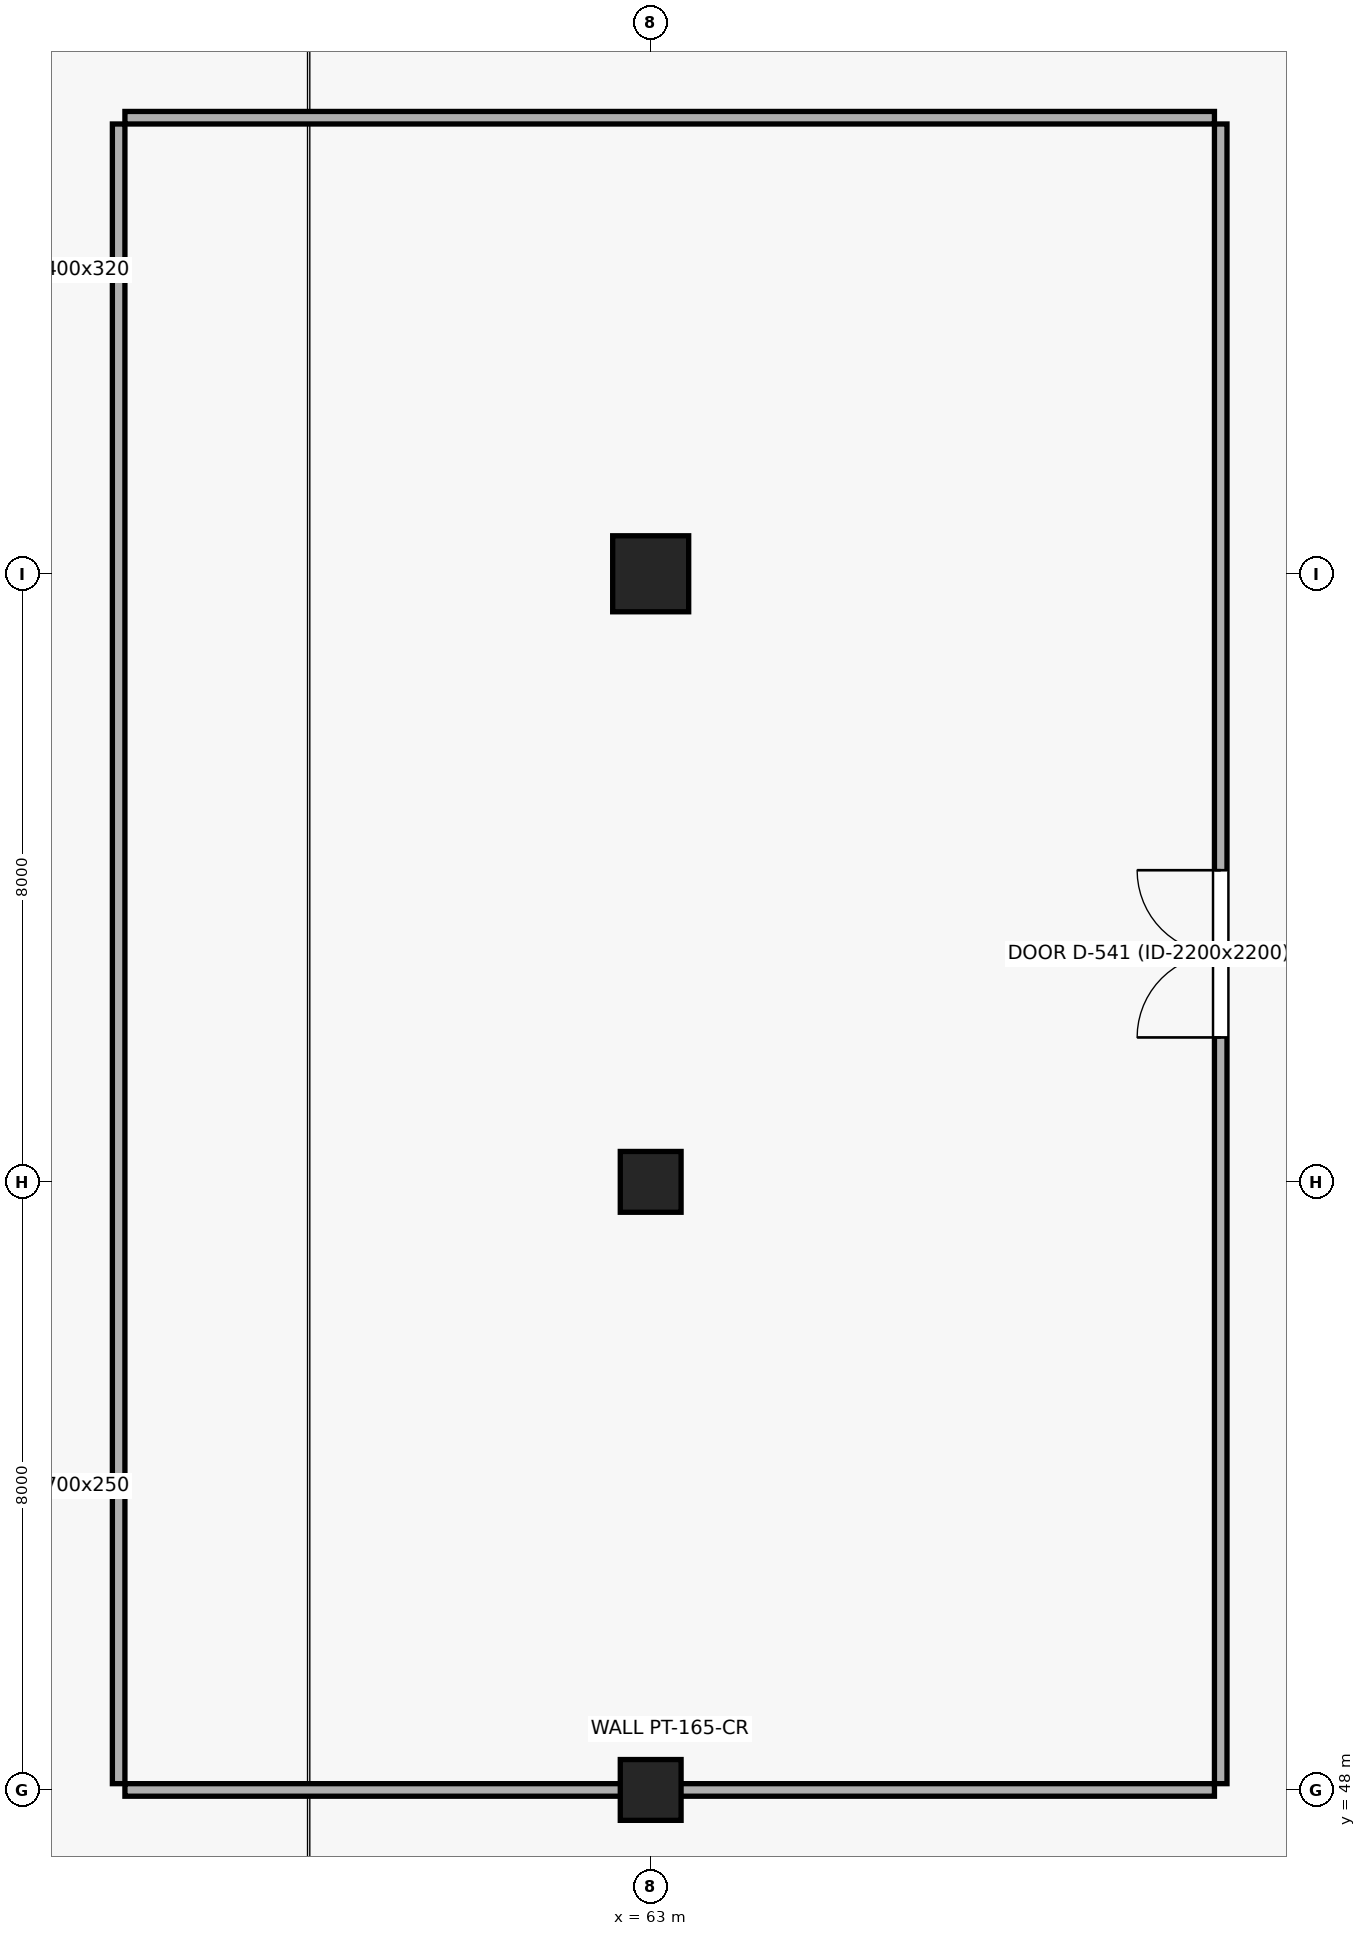
"""IFC4 building model, lengths in metres.
Left out: names, types, materials, properties, quantities, classifications, styles, units other than length and angle.
Written with IfcOpenShell. Run it as: python <this file> out.ifc"""

import sys

from ifc_helpers import new_model, si_unit, direction, frame, frame_2d, origin, origin_2d, place, context, subcontext, project, spatial, rectangle, extrude, element, fill, save


model = new_model("IFC4")
c1 = context("Model", 3, precision=1e-05, world=origin(), true_north=direction((0.0, 1.0)))
c2 = subcontext(c1, "Body", "Model", "MODEL_VIEW")
j1 = project(units=[si_unit("LENGTHUNIT", "METRE"), si_unit("PLANEANGLEUNIT", "RADIAN")], contexts=[c1])
p1 = place(None, origin())
s1 = spatial("IfcSite", under=j1, at=p1, CompositionType="ELEMENT")
p2 = place(p1, origin())
s2 = spatial("IfcBuilding", under=s1, at=p2, CompositionType="ELEMENT")
p3 = place(p2, frame((0.0, 0.0, 9.0)))
s3 = spatial("IfcBuildingStorey", under=s2, at=p3, CompositionType="ELEMENT", Elevation=9.0)
for number, where, z_axis, x_axis in (
    (1, (63.0, 48.0, 0.0), (0.0, 0.0, 1.0), (1.0, 0.0, 0.0)),
    (2, (63.0, 56.0, 0.0), (0.0, 0.0, 1.0), (1.0, 0.0, 0.0)),
):
    element("IfcColumn", number, at=place(p3, frame(where, z_axis=z_axis, x_axis=x_axis)), inside=s3, PredefinedType="COLUMN", context=c2, shape_type="SweptSolid", body=[
        extrude(rectangle(XDim=0.8, YDim=0.8, at=origin_2d()), origin(), (0.0, 0.0, 1.0), 4.5),
    ])
p4 = place(p3, frame((63.0, 64.0, 0.0), z_axis=(0.0, 0.0, 1.0), x_axis=(1.0, 0.0, 0.0)))
e3 = element("IfcColumn", 3, at=p4, inside=s3, PredefinedType="COLUMN", context=c2, shape_type="SweptSolid", body=[
    extrude(rectangle(XDim=1.0, YDim=1.0, at=origin_2d()), origin(), (0.0, 0.0, 1.0), 4.5),
])
p5 = place(p3, frame((56.083, 48.0, 0.0), z_axis=(0.0, 0.0, 1.0), x_axis=(1.0, 0.0, 0.0)))
e4 = element("IfcWall", 4, at=p5, inside=s3, PredefinedType="PARTITIONING", context=c2, shape_type="SweptSolid", body=[
    extrude(rectangle(XDim=14.335, YDim=0.165, at=frame_2d((7.167, 0.0))), origin(), (0.0, 0.0, 1.0), 3.24),
])
p6 = place(p3, frame((56.083, 70.0, 0.0), z_axis=(0.0, 0.0, 1.0), x_axis=(1.0, 0.0, 0.0)))
e5 = element("IfcWall", 5, at=p6, inside=s3, PredefinedType="PARTITIONING", context=c2, shape_type="SweptSolid", body=[
    extrude(rectangle(XDim=14.335, YDim=0.165, at=frame_2d((7.167, 0.0))), origin(), (0.0, 0.0, 1.0), 4.14),
])
p7 = place(p3, frame((56.0, 48.083, 0.0), z_axis=(0.0, 0.0, 1.0), x_axis=(0.0, 1.0, 0.0)))
e6 = element("IfcWall", 6, at=p7, inside=s3, PredefinedType="PARTITIONING", context=c2, shape_type="SweptSolid", body=[
    extrude(rectangle(XDim=21.835, YDim=0.165, at=frame_2d((10.917, 0.0))), origin(), (0.0, 0.0, 1.0), 4.14),
])
p8 = place(p3, frame((70.5, 48.083, 0.0), z_axis=(0.0, 0.0, 1.0), x_axis=(0.0, 1.0, 0.0)))
e7 = element("IfcWall", 7, at=p8, inside=s3, PredefinedType="PARTITIONING", context=c2, shape_type="SweptSolid", body=[
    extrude(rectangle(XDim=21.835, YDim=0.165, at=frame_2d((10.917, 0.0))), origin(), (0.0, 0.0, 1.0), 4.14),
])
p9 = place(p8, frame((9.817, 0.0, 0.0)))
e8 = element("IfcOpeningElement", 8, at=p9, cuts=e7, PredefinedType="OPENING", context=c2, shape_type="SweptSolid", body=[
    extrude(rectangle(XDim=2.2, YDim=2.2, at=frame_2d((1.1, 1.1))), frame((0.0, 0.094, 0.0), z_axis=(0.0, -1.0, 0.0), x_axis=(1.0, 0.0, 0.0)), (0.0, 0.0, 1.0), 0.189),
])
p10 = place(p9, origin())
e9 = element("IfcDoor", 9, at=p10, inside=s3, OperationType="DOUBLE_DOOR_SINGLE_SWING", PredefinedType="DOOR", context=c2, shape_type="SweptSolid", body=[
    extrude(rectangle(XDim=2.2, YDim=2.2, at=frame_2d((1.1, 1.1))), frame((0.0, 0.025, 0.0), z_axis=(0.0, -1.0, 0.0), x_axis=(1.0, 0.0, 0.0)), (0.0, 0.0, 1.0), 0.05),
])
fill(e8, e9)
save(model, sys.argv[1])
